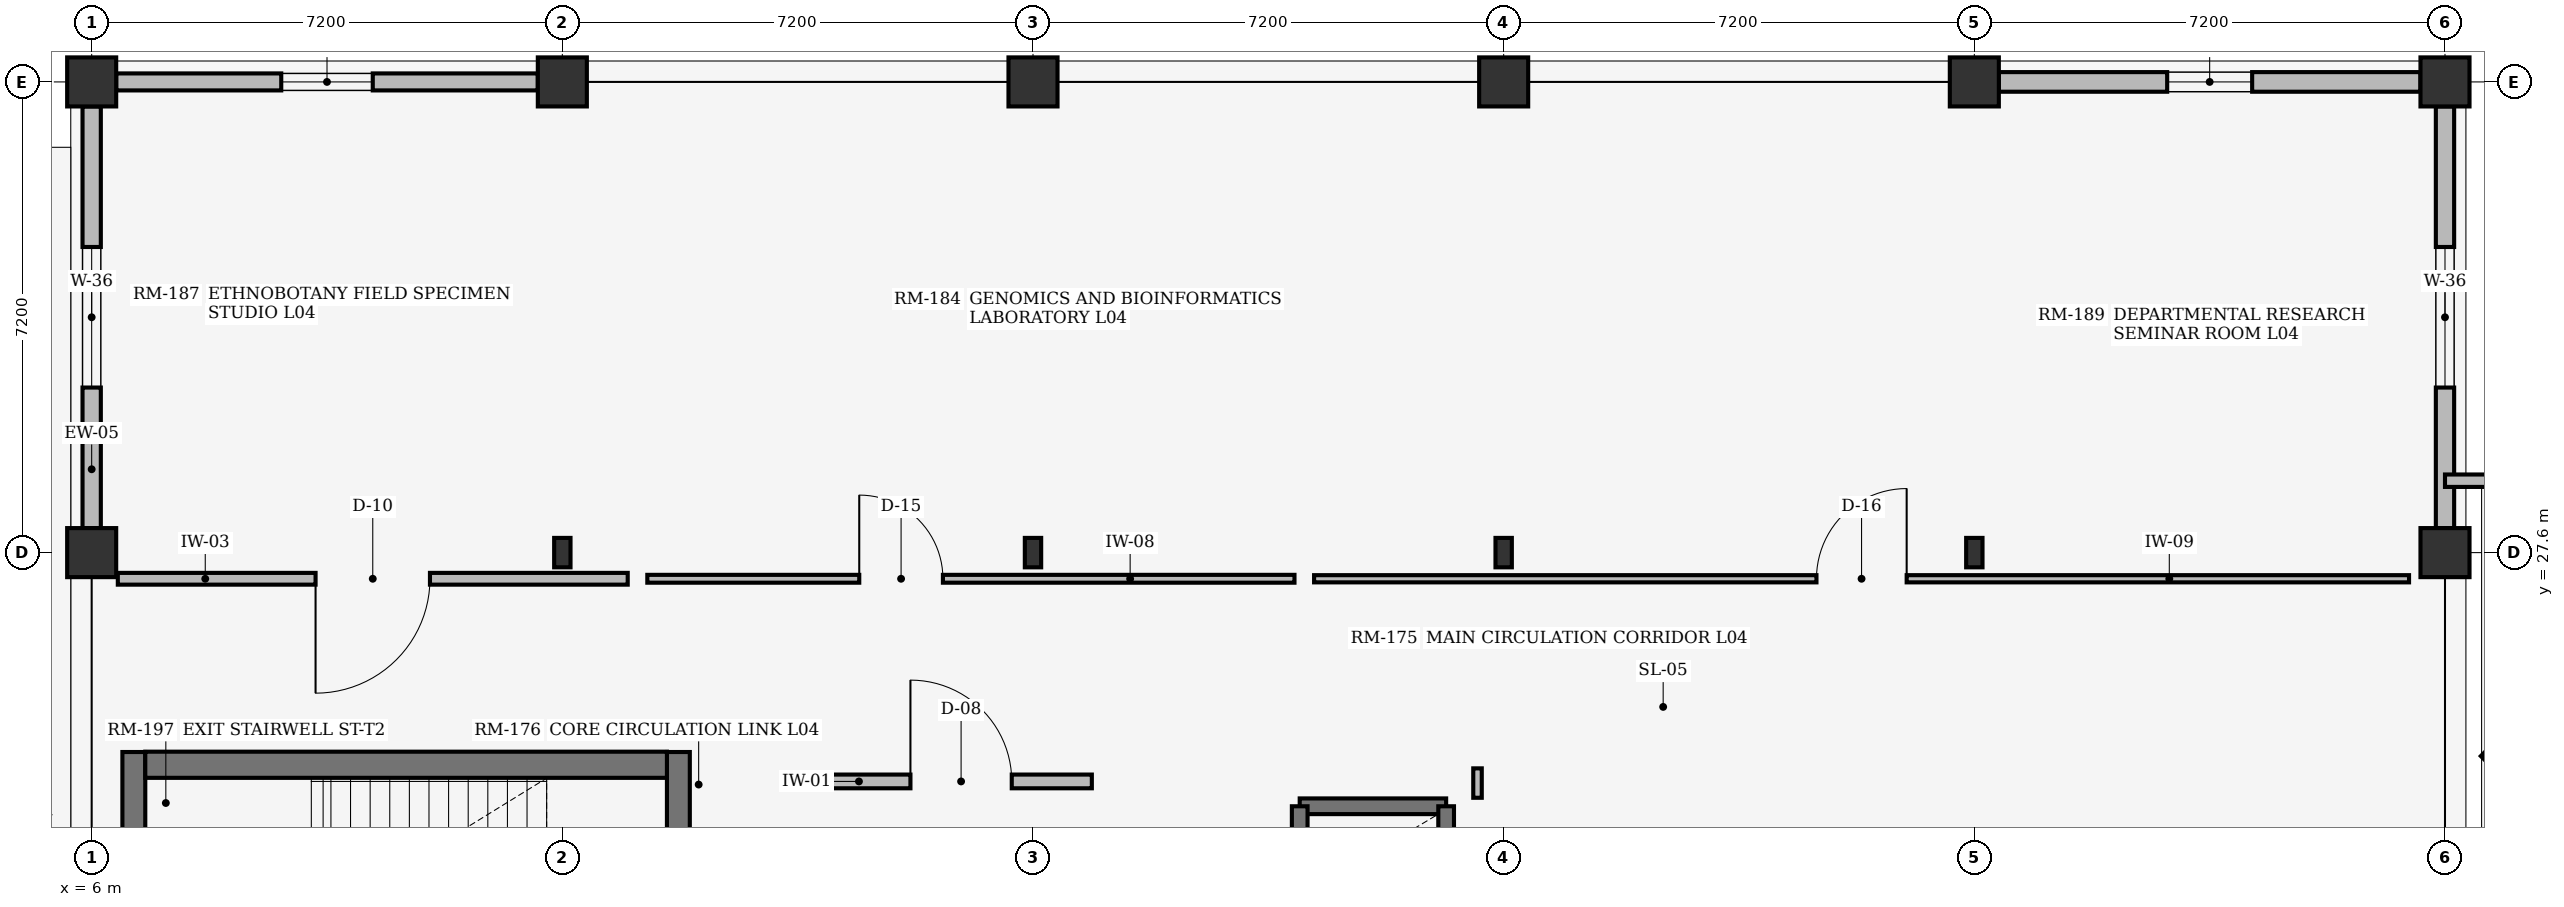
"""IFC4 building model, lengths in metres.
Left out: names, types, materials, properties, quantities, classifications, styles, units other than length and angle.
Written with IfcOpenShell. Run it as: python <this file> out.ifc"""

import sys

from ifc_helpers import new_model, si_unit, direction, frame, frame_2d, origin, origin_2d, place, context, subcontext, project, spatial, rectangle, i_section, extrude, element, fill, save


model = new_model("IFC4")
c1 = context("Model", 3, precision=1e-05, world=origin(), true_north=direction((0.0, 1.0)))
c2 = subcontext(c1, "Body", "Model", "MODEL_VIEW")
j1 = project(units=[si_unit("LENGTHUNIT", "METRE"), si_unit("PLANEANGLEUNIT", "RADIAN")], contexts=[c1])
p1 = place(None, origin())
s1 = spatial("IfcSite", under=j1, at=p1, CompositionType="ELEMENT")
p2 = place(p1, origin())
s2 = spatial("IfcBuilding", under=s1, at=p2, CompositionType="ELEMENT")
p3 = place(p2, frame((0.0, 0.0, 17.1)))
s3 = spatial("IfcBuildingStorey", under=s2, at=p3, CompositionType="ELEMENT", Elevation=17.1)
for number, where, z_axis, x_axis in (
    (1, (6.0, 27.6, 0.0), (0.0, 0.0, 1.0), (1.0, 0.0, 0.0)),
    (2, (6.0, 34.8, 0.0), (0.0, 0.0, 1.0), (1.0, 0.0, 0.0)),
):
    element("IfcColumn", number, at=place(p3, frame(where, z_axis=z_axis, x_axis=x_axis)), inside=s3, PredefinedType="COLUMN", context=c2, shape_type="SweptSolid", body=[
        extrude(rectangle(XDim=0.75, YDim=0.75, at=origin_2d()), origin(), (0.0, 0.0, 1.0), 3.66),
    ])
p4 = place(p3, frame((13.2, 27.6, 0.0), z_axis=(0.0, 0.0, 1.0), x_axis=(1.0, 0.0, 0.0)))
e3 = element("IfcColumn", 3, at=p4, inside=s3, PredefinedType="COLUMN", context=c2, shape_type="SweptSolid", body=[
    extrude(i_section(OverallWidth=0.25, OverallDepth=0.45, WebThickness=0.011, FlangeThickness=0.014, at=origin_2d()), origin(), (0.0, 0.0, 1.0), 3.66),
])
p5 = place(p3, frame((13.2, 34.8, 0.0), z_axis=(0.0, 0.0, 1.0), x_axis=(1.0, 0.0, 0.0)))
e4 = element("IfcColumn", 4, at=p5, inside=s3, PredefinedType="COLUMN", context=c2, shape_type="SweptSolid", body=[
    extrude(rectangle(XDim=0.75, YDim=0.75, at=origin_2d()), origin(), (0.0, 0.0, 1.0), 3.66),
])
p6 = place(p3, frame((20.4, 27.6, 0.0), z_axis=(0.0, 0.0, 1.0), x_axis=(1.0, 0.0, 0.0)))
e5 = element("IfcColumn", 5, at=p6, inside=s3, PredefinedType="COLUMN", context=c2, shape_type="SweptSolid", body=[
    extrude(i_section(OverallWidth=0.25, OverallDepth=0.45, WebThickness=0.011, FlangeThickness=0.014, at=origin_2d()), origin(), (0.0, 0.0, 1.0), 3.66),
])
p7 = place(p3, frame((20.4, 34.8, 0.0), z_axis=(0.0, 0.0, 1.0), x_axis=(1.0, 0.0, 0.0)))
e6 = element("IfcColumn", 6, at=p7, inside=s3, PredefinedType="COLUMN", context=c2, shape_type="SweptSolid", body=[
    extrude(rectangle(XDim=0.75, YDim=0.75, at=origin_2d()), origin(), (0.0, 0.0, 1.0), 3.66),
])
p8 = place(p3, frame((27.6, 27.6, 0.0), z_axis=(0.0, 0.0, 1.0), x_axis=(1.0, 0.0, 0.0)))
e7 = element("IfcColumn", 7, at=p8, inside=s3, PredefinedType="COLUMN", context=c2, shape_type="SweptSolid", body=[
    extrude(i_section(OverallWidth=0.25, OverallDepth=0.45, WebThickness=0.011, FlangeThickness=0.014, at=origin_2d()), origin(), (0.0, 0.0, 1.0), 3.66),
])
p9 = place(p3, frame((27.6, 34.8, 0.0), z_axis=(0.0, 0.0, 1.0), x_axis=(1.0, 0.0, 0.0)))
e8 = element("IfcColumn", 8, at=p9, inside=s3, PredefinedType="COLUMN", context=c2, shape_type="SweptSolid", body=[
    extrude(rectangle(XDim=0.75, YDim=0.75, at=origin_2d()), origin(), (0.0, 0.0, 1.0), 3.66),
])
p10 = place(p3, frame((34.8, 27.6, 0.0), z_axis=(0.0, 0.0, 1.0), x_axis=(1.0, 0.0, 0.0)))
e9 = element("IfcColumn", 9, at=p10, inside=s3, PredefinedType="COLUMN", context=c2, shape_type="SweptSolid", body=[
    extrude(i_section(OverallWidth=0.25, OverallDepth=0.45, WebThickness=0.011, FlangeThickness=0.014, at=origin_2d()), origin(), (0.0, 0.0, 1.0), 3.66),
])
for number, where, z_axis, x_axis in (
    (10, (34.8, 34.8, 0.0), (0.0, 0.0, 1.0), (1.0, 0.0, 0.0)),
    (11, (42.0, 27.6, 0.0), (0.0, 0.0, 1.0), (1.0, 0.0, 0.0)),
    (12, (42.0, 34.8, 0.0), (0.0, 0.0, 1.0), (1.0, 0.0, 0.0)),
):
    element("IfcColumn", number, at=place(p3, frame(where, z_axis=z_axis, x_axis=x_axis)), inside=s3, PredefinedType="COLUMN", context=c2, shape_type="SweptSolid", body=[
        extrude(rectangle(XDim=0.75, YDim=0.75, at=origin_2d()), origin(), (0.0, 0.0, 1.0), 3.66),
    ])
p11 = place(p3, frame((6.375, 34.8, 0.0), z_axis=(0.0, 0.0, 1.0), x_axis=(1.0, 0.0, 0.0)))
e13 = element("IfcWall", 13, at=p11, inside=s3, PredefinedType="STANDARD", context=c2, shape_type="SweptSolid", body=[
    extrude(rectangle(XDim=6.45, YDim=0.26, at=frame_2d((3.225, 0.0))), origin(), (0.0, 0.0, 1.0), 3.04),
])
p12 = place(p11, frame((2.525, 0.0, 0.75)))
e14 = element("IfcOpeningElement", 14, at=p12, cuts=e13, PredefinedType="OPENING", context=c2, shape_type="SweptSolid", body=[
    extrude(rectangle(XDim=1.4, YDim=1.25, at=frame_2d((0.7, 0.625))), frame((0.0, 0.14, 0.0), z_axis=(0.0, -1.0, 0.0), x_axis=(1.0, 0.0, 0.0)), (0.0, 0.0, 1.0), 0.28),
])
p13 = place(p3, frame((35.175, 34.8, 0.0), z_axis=(0.0, 0.0, 1.0), x_axis=(1.0, 0.0, 0.0)))
e15 = element("IfcWall", 15, at=p13, inside=s3, PredefinedType="STANDARD", context=c2, shape_type="SweptSolid", body=[
    extrude(rectangle(XDim=6.45, YDim=0.3, at=frame_2d((3.225, 0.0))), origin(), (0.0, 0.0, 1.0), 3.04),
])
p14 = place(p13, frame((2.575, 0.0, 0.75)))
e16 = element("IfcOpeningElement", 16, at=p14, cuts=e15, PredefinedType="OPENING", context=c2, shape_type="SweptSolid", body=[
    extrude(rectangle(XDim=1.3, YDim=1.35, at=frame_2d((0.65, 0.675))), frame((0.0, 0.16, 0.0), z_axis=(0.0, -1.0, 0.0), x_axis=(1.0, 0.0, 0.0)), (0.0, 0.0, 1.0), 0.32),
])
p15 = place(p3, frame((6.0, 27.975, 0.0), z_axis=(0.0, 0.0, 1.0), x_axis=(0.0, 1.0, 0.0)))
e17 = element("IfcWall", 17, at=p15, inside=s3, PredefinedType="STANDARD", context=c2, shape_type="SweptSolid", body=[
    extrude(rectangle(XDim=6.45, YDim=0.28, at=frame_2d((3.225, 0.0))), origin(), (0.0, 0.0, 1.0), 3.04),
])
p16 = place(p15, frame((2.15, 0.0, 0.75)))
e18 = element("IfcOpeningElement", 18, at=p16, cuts=e17, PredefinedType="OPENING", context=c2, shape_type="SweptSolid", body=[
    extrude(rectangle(XDim=2.15, YDim=1.35, at=frame_2d((1.075, 0.675))), frame((0.0, 0.15, 0.0), z_axis=(0.0, -1.0, 0.0), x_axis=(1.0, 0.0, 0.0)), (0.0, 0.0, 1.0), 0.3),
])
p17 = place(p3, frame((42.0, 27.975, 0.0), z_axis=(0.0, 0.0, 1.0), x_axis=(0.0, 1.0, 0.0)))
e19 = element("IfcWall", 19, at=p17, inside=s3, PredefinedType="STANDARD", context=c2, shape_type="SweptSolid", body=[
    extrude(rectangle(XDim=6.45, YDim=0.28, at=frame_2d((3.225, 0.0))), origin(), (0.0, 0.0, 1.0), 3.04),
])
p18 = place(p17, frame((2.15, 0.0, 0.75)))
e20 = element("IfcOpeningElement", 20, at=p18, cuts=e19, PredefinedType="OPENING", context=c2, shape_type="SweptSolid", body=[
    extrude(rectangle(XDim=2.15, YDim=1.35, at=frame_2d((1.075, 0.675))), frame((0.0, 0.15, 0.0), z_axis=(0.0, -1.0, 0.0), x_axis=(1.0, 0.0, 0.0)), (0.0, 0.0, 1.0), 0.3),
])
p19 = place(p3, frame((88.1, 28.7, 0.0), z_axis=(0.0, 0.0, 1.0), x_axis=(-1.0, 0.0, 0.0)))
e21 = element("IfcWall", 21, at=p19, inside=s3, PredefinedType="PARAPET", context=c2, shape_type="SweptSolid", body=[
    extrude(rectangle(XDim=46.1, YDim=0.19, at=frame_2d((23.05, 0.0))), origin(), (0.0, 0.0, 1.0), 1.2),
])
p20 = place(p3, frame((14.975, 24.55, 0.0), z_axis=(0.0, 0.0, 1.0), x_axis=(0.0, -1.0, 0.0)))
e22 = element("IfcWall", 22, at=p20, inside=s3, PredefinedType="SHEAR", context=c2, shape_type="SweptSolid", body=[
    extrude(rectangle(XDim=4.59, YDim=0.35, at=frame_2d((2.295, 0.0))), origin(), (0.0, 0.0, 1.0), 3.66),
])
p21 = place(p20, frame((1.72, 0.0, 0.0)))
e23 = element("IfcOpeningElement", 23, at=p21, cuts=e22, PredefinedType="OPENING", context=c2, shape_type="SweptSolid", body=[
    extrude(rectangle(XDim=1.15, YDim=2.2, at=frame_2d((0.575, 1.1))), frame((0.0, 0.185, 0.0), z_axis=(0.0, -1.0, 0.0), x_axis=(1.0, 0.0, 0.0)), (0.0, 0.0, 1.0), 0.37),
])
p22 = place(p3, frame((6.645, 24.55, 0.0), z_axis=(0.0, 0.0, 1.0), x_axis=(0.0, -1.0, 0.0)))
e24 = element("IfcWall", 24, at=p22, inside=s3, PredefinedType="SHEAR", context=c2, shape_type="SweptSolid", body=[
    extrude(rectangle(XDim=4.59, YDim=0.35, at=frame_2d((2.295, 0.0))), origin(), (0.0, 0.0, 1.0), 3.66),
])
p23 = place(p3, frame((14.8, 24.355, 0.0), z_axis=(0.0, 0.0, 1.0), x_axis=(-1.0, 0.0, 0.0)))
e25 = element("IfcWall", 25, at=p23, inside=s3, PredefinedType="SHEAR", context=c2, shape_type="SweptSolid", body=[
    extrude(rectangle(XDim=7.98, YDim=0.4, at=frame_2d((3.99, 0.0))), origin(), (0.0, 0.0, 1.0), 3.66),
])
p24 = place(p3, frame((24.48, 23.72, 0.0), z_axis=(0.0, 0.0, 1.0), x_axis=(1.0, 0.0, 0.0)))
e26 = element("IfcWall", 26, at=p24, inside=s3, PredefinedType="SHEAR", context=c2, shape_type="SweptSolid", body=[
    extrude(rectangle(XDim=2.24, YDim=0.24, at=frame_2d((1.12, 0.0))), origin(), (0.0, 0.0, 1.0), 3.66),
])
for number, where, z_axis, x_axis in (
    (27, (24.48, 20.78, 0.0), (0.0, 0.0, 1.0), (0.0, 1.0, 0.0)),
    (28, (26.72, 20.78, 0.0), (0.0, 0.0, 1.0), (0.0, 1.0, 0.0)),
):
    element("IfcWall", number, at=place(p3, frame(where, z_axis=z_axis, x_axis=x_axis)), inside=s3, PredefinedType="SHEAR", context=c2, shape_type="SweptSolid", body=[
        extrude(rectangle(XDim=2.94, YDim=0.24, at=frame_2d((1.47, 0.0))), origin(), (0.0, 0.0, 1.0), 3.66),
    ])
p25 = place(p3, frame((17.3, 24.1, 0.0), z_axis=(0.0, 0.0, 1.0), x_axis=(1.0, 0.0, 0.0)))
e29 = element("IfcWall", 29, at=p25, inside=s3, PredefinedType="PARTITIONING", context=c2, shape_type="SweptSolid", body=[
    extrude(rectangle(XDim=4.0, YDim=0.21, at=frame_2d((2.0, 0.0))), origin(), (0.0, 0.0, 1.0), 3.64),
])
p26 = place(p25, frame((1.225, 0.0, 0.0)))
e30 = element("IfcOpeningElement", 30, at=p26, cuts=e29, PredefinedType="OPENING", context=c2, shape_type="SweptSolid", body=[
    extrude(rectangle(XDim=1.55, YDim=2.25, at=frame_2d((0.775, 1.125))), frame((0.0, 0.115, 0.0), z_axis=(0.0, -1.0, 0.0), x_axis=(1.0, 0.0, 0.0)), (0.0, 0.0, 1.0), 0.23),
])
p27 = place(p3, frame((6.4, 27.2, 0.0), z_axis=(0.0, 0.0, 1.0), x_axis=(1.0, 0.0, 0.0)))
e31 = element("IfcWall", 31, at=p27, inside=s3, PredefinedType="PARTITIONING", context=c2, shape_type="SweptSolid", body=[
    extrude(rectangle(XDim=7.8, YDim=0.18, at=frame_2d((3.9, 0.0))), origin(), (0.0, 0.0, 1.0), 3.64),
])
p28 = place(p27, frame((3.025, 0.0, 0.0)))
e32 = element("IfcOpeningElement", 32, at=p28, cuts=e31, PredefinedType="OPENING", context=c2, shape_type="SweptSolid", body=[
    extrude(rectangle(XDim=1.75, YDim=2.3, at=frame_2d((0.875, 1.15))), frame((0.0, 0.1, 0.0), z_axis=(0.0, -1.0, 0.0), x_axis=(1.0, 0.0, 0.0)), (0.0, 0.0, 1.0), 0.2),
])
p29 = place(p3, frame((27.2, 24.3, 0.0), z_axis=(0.0, 0.0, 1.0), x_axis=(0.0, -1.0, 0.0)))
e33 = element("IfcWall", 33, at=p29, inside=s3, PredefinedType="PARTITIONING", context=c2, shape_type="SweptSolid", body=[
    extrude(rectangle(XDim=0.45, YDim=0.13, at=frame_2d((0.225, 0.0))), origin(), (0.0, 0.0, 1.0), 3.64),
])
p30 = place(p3, frame((14.5, 27.2, 0.0), z_axis=(0.0, 0.0, 1.0), x_axis=(1.0, 0.0, 0.0)))
e34 = element("IfcWall", 34, at=p30, inside=s3, PredefinedType="PARTITIONING", context=c2, shape_type="SweptSolid", body=[
    extrude(rectangle(XDim=9.9, YDim=0.12, at=frame_2d((4.95, 0.0))), origin(), (0.0, 0.0, 1.0), 3.64),
])
p31 = place(p30, frame((3.242, 0.0, 0.0)))
e35 = element("IfcOpeningElement", 35, at=p31, cuts=e34, PredefinedType="OPENING", context=c2, shape_type="SweptSolid", body=[
    extrude(rectangle(XDim=1.28, YDim=2.15, at=frame_2d((0.64, 1.075))), frame((0.0, 0.07, 0.0), z_axis=(0.0, -1.0, 0.0), x_axis=(1.0, 0.0, 0.0)), (0.0, 0.0, 1.0), 0.14),
])
p32 = place(p3, frame((24.7, 27.2, 0.0), z_axis=(0.0, 0.0, 1.0), x_axis=(1.0, 0.0, 0.0)))
e36 = element("IfcWall", 36, at=p32, inside=s3, PredefinedType="PARTITIONING", context=c2, shape_type="SweptSolid", body=[
    extrude(rectangle(XDim=16.75, YDim=0.11, at=frame_2d((8.375, 0.0))), origin(), (0.0, 0.0, 1.0), 3.64),
])
p33 = place(p32, frame((7.685, 0.0, 0.0)))
e37 = element("IfcOpeningElement", 37, at=p33, cuts=e36, PredefinedType="OPENING", context=c2, shape_type="SweptSolid", body=[
    extrude(rectangle(XDim=1.38, YDim=2.15, at=frame_2d((0.69, 1.075))), frame((0.0, 0.065, 0.0), z_axis=(0.0, -1.0, 0.0), x_axis=(1.0, 0.0, 0.0)), (0.0, 0.0, 1.0), 0.13),
])
p34 = place(p12, origin())
e38 = element("IfcWindow", 38, at=p34, inside=s3, PartitioningType="SINGLE_PANEL", PredefinedType="WINDOW", context=c2, shape_type="SweptSolid", body=[
    extrude(rectangle(XDim=1.4, YDim=1.25, at=frame_2d((0.7, 0.625))), frame((0.0, 0.03, 0.0), z_axis=(0.0, -1.0, 0.0), x_axis=(1.0, 0.0, 0.0)), (0.0, 0.0, 1.0), 0.06),
])
fill(e14, e38)
p35 = place(p14, origin())
e39 = element("IfcWindow", 39, at=p35, inside=s3, PartitioningType="SINGLE_PANEL", PredefinedType="WINDOW", context=c2, shape_type="SweptSolid", body=[
    extrude(rectangle(XDim=1.3, YDim=1.35, at=frame_2d((0.65, 0.675))), frame((0.0, 0.03, 0.0), z_axis=(0.0, -1.0, 0.0), x_axis=(1.0, 0.0, 0.0)), (0.0, 0.0, 1.0), 0.06),
])
fill(e16, e39)
p36 = place(p16, origin())
e40 = element("IfcWindow", 40, at=p36, inside=s3, PartitioningType="SINGLE_PANEL", PredefinedType="WINDOW", context=c2, shape_type="SweptSolid", body=[
    extrude(rectangle(XDim=2.15, YDim=1.35, at=frame_2d((1.075, 0.675))), frame((0.0, 0.03, 0.0), z_axis=(0.0, -1.0, 0.0), x_axis=(1.0, 0.0, 0.0)), (0.0, 0.0, 1.0), 0.06),
])
fill(e18, e40)
p37 = place(p18, origin())
e41 = element("IfcWindow", 41, at=p37, inside=s3, PartitioningType="SINGLE_PANEL", PredefinedType="WINDOW", context=c2, shape_type="SweptSolid", body=[
    extrude(rectangle(XDim=2.15, YDim=1.35, at=frame_2d((1.075, 0.675))), frame((0.0, 0.03, 0.0), z_axis=(0.0, -1.0, 0.0), x_axis=(1.0, 0.0, 0.0)), (0.0, 0.0, 1.0), 0.06),
])
fill(e20, e41)
p38 = place(p26, origin())
e42 = element("IfcDoor", 42, at=p38, inside=s3, OperationType="DOUBLE_DOOR_SINGLE_SWING", PredefinedType="DOOR", context=c2, shape_type="SweptSolid", body=[
    extrude(rectangle(XDim=1.55, YDim=2.25, at=frame_2d((0.775, 1.125))), frame((0.0, 0.025, 0.0), z_axis=(0.0, -1.0, 0.0), x_axis=(1.0, 0.0, 0.0)), (0.0, 0.0, 1.0), 0.05),
])
fill(e30, e42)
p39 = place(p28, frame((1.75, 0.0, 0.0), z_axis=(0.0, 0.0, 1.0), x_axis=(-1.0, 0.0, 0.0)))
e43 = element("IfcDoor", 43, at=p39, inside=s3, OperationType="DOUBLE_DOOR_SINGLE_SWING", PredefinedType="DOOR", context=c2, shape_type="SweptSolid", body=[
    extrude(rectangle(XDim=1.75, YDim=2.3, at=frame_2d((0.875, 1.15))), frame((0.0, 0.025, 0.0), z_axis=(0.0, -1.0, 0.0), x_axis=(1.0, 0.0, 0.0)), (0.0, 0.0, 1.0), 0.05),
])
fill(e32, e43)
p40 = place(p31, origin())
e44 = element("IfcDoor", 44, at=p40, inside=s3, OperationType="SINGLE_SWING_LEFT", PredefinedType="DOOR", context=c2, shape_type="SweptSolid", body=[
    extrude(rectangle(XDim=1.28, YDim=2.15, at=frame_2d((0.64, 1.075))), frame((0.0, 0.025, 0.0), z_axis=(0.0, -1.0, 0.0), x_axis=(1.0, 0.0, 0.0)), (0.0, 0.0, 1.0), 0.05),
])
fill(e35, e44)
p41 = place(p33, frame((1.38, 0.0, 0.0), z_axis=(0.0, 0.0, 1.0), x_axis=(-1.0, 0.0, 0.0)))
e45 = element("IfcDoor", 45, at=p41, inside=s3, OperationType="SINGLE_SWING_RIGHT", PredefinedType="DOOR", context=c2, shape_type="SweptSolid", body=[
    extrude(rectangle(XDim=1.38, YDim=2.15, at=frame_2d((0.69, 1.075))), frame((0.0, 0.025, 0.0), z_axis=(0.0, -1.0, 0.0), x_axis=(1.0, 0.0, 0.0)), (0.0, 0.0, 1.0), 0.05),
])
fill(e37, e45)
save(model, sys.argv[1])
